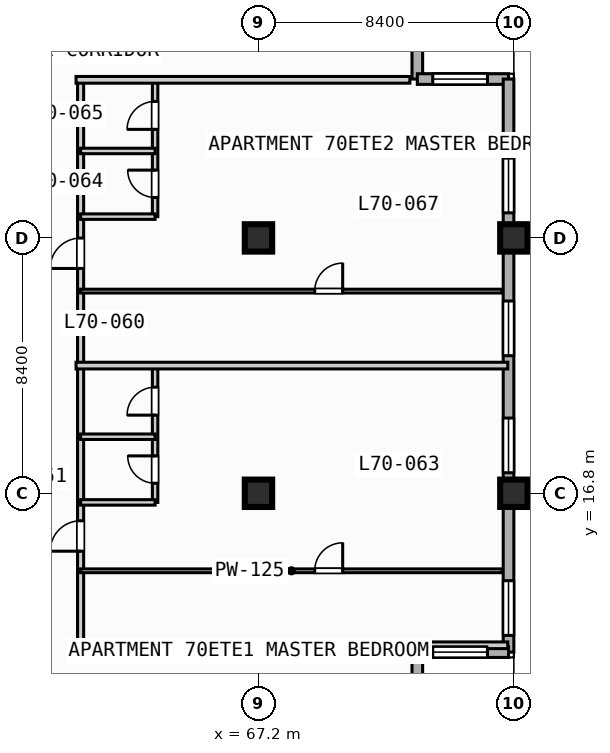
"""IFC4 building model, lengths in metres.
Left out: names, types, materials, properties, quantities, classifications, styles, units other than length and angle.
Written with IfcOpenShell. Run it as: python <this file> out.ifc"""

import sys

from ifc_helpers import new_model, si_unit, direction, frame, frame_2d, origin, origin_2d, place, context, subcontext, project, spatial, rectangle, extrude, element, fill, save


model = new_model("IFC4")
c1 = context("Model", 3, precision=1e-05, world=origin(), true_north=direction((0.0, 1.0)))
c2 = subcontext(c1, "Body", "Model", "MODEL_VIEW")
j1 = project(units=[si_unit("LENGTHUNIT", "METRE"), si_unit("PLANEANGLEUNIT", "RADIAN")], contexts=[c1])
p1 = place(None, origin())
s1 = spatial("IfcSite", under=j1, at=p1, CompositionType="ELEMENT")
p2 = place(p1, origin())
s2 = spatial("IfcBuilding", under=s1, at=p2, CompositionType="ELEMENT")
p3 = place(p2, frame((0.0, 0.0, 282.3)))
s3 = spatial("IfcBuildingStorey", under=s2, at=p3, CompositionType="ELEMENT", Elevation=282.3)
for number, where, z_axis, x_axis in (
    (1, (67.2, 16.8, 0.0), (0.0, 0.0, 1.0), (1.0, 0.0, 0.0)),
    (2, (67.2, 25.2, 0.0), (0.0, 0.0, 1.0), (1.0, 0.0, 0.0)),
    (3, (75.6, 16.8, 0.0), (0.0, 0.0, 1.0), (1.0, 0.0, 0.0)),
    (4, (75.6, 25.2, 0.0), (0.0, 0.0, 1.0), (1.0, 0.0, 0.0)),
):
    element("IfcColumn", number, at=place(p3, frame(where, z_axis=z_axis, x_axis=x_axis)), inside=s3, PredefinedType="COLUMN", context=c2, shape_type="SweptSolid", body=[
        extrude(rectangle(XDim=0.9, YDim=0.9, at=origin_2d()), origin(), (0.0, 0.0, 1.0), 3.7),
    ])
p4 = place(p3, frame((72.425, 33.425, 0.0), z_axis=(0.0, 0.0, 1.0), x_axis=(0.0, -1.0, 0.0)))
e5 = element("IfcWall", 5, at=p4, inside=s3, PredefinedType="STANDARD", context=c2, shape_type="SweptSolid", body=[
    extrude(rectangle(XDim=3.0, YDim=0.35, at=frame_2d((1.5, 0.0))), origin(), (0.0, 0.0, 1.0), 3.47),
])
p5 = place(p3, frame((72.425, 30.425, 0.0), z_axis=(0.0, 0.0, 1.0), x_axis=(1.0, 0.0, 0.0)))
e6 = element("IfcWall", 6, at=p5, inside=s3, PredefinedType="STANDARD", context=c2, shape_type="SweptSolid", body=[
    extrude(rectangle(XDim=3.0, YDim=0.35, at=frame_2d((1.5, 0.0))), origin(), (0.0, 0.0, 1.0), 3.47),
])
p6 = place(p5, frame((0.508, 0.0, 0.85)))
e7 = element("IfcOpeningElement", 7, at=p6, cuts=e6, PredefinedType="OPENING", context=c2, shape_type="SweptSolid", body=[
    extrude(rectangle(XDim=1.8, YDim=1.8, at=frame_2d((0.9, 0.9))), frame((0.0, 0.185, 0.0), z_axis=(0.0, -1.0, 0.0), x_axis=(1.0, 0.0, 0.0)), (0.0, 0.0, 1.0), 0.37),
])
p7 = place(p3, frame((75.425, 30.425, 0.0), z_axis=(0.0, 0.0, 1.0), x_axis=(0.0, -1.0, 0.0)))
e8 = element("IfcWall", 8, at=p7, inside=s3, PredefinedType="STANDARD", context=c2, shape_type="SweptSolid", body=[
    extrude(rectangle(XDim=18.85, YDim=0.35, at=frame_2d((9.425, 0.0))), origin(), (0.0, 0.0, 1.0), 3.47),
])
p8 = place(p7, frame((16.5, 0.0, 0.85)))
e9 = element("IfcOpeningElement", 9, at=p8, cuts=e8, PredefinedType="OPENING", context=c2, shape_type="SweptSolid", body=[
    extrude(rectangle(XDim=1.8, YDim=1.8, at=frame_2d((0.9, 0.9))), frame((0.0, 0.185, 0.0), z_axis=(0.0, -1.0, 0.0), x_axis=(1.0, 0.0, 0.0)), (0.0, 0.0, 1.0), 0.37),
])
p9 = place(p7, frame((11.15, 0.0, 0.85)))
e10 = element("IfcOpeningElement", 10, at=p9, cuts=e8, PredefinedType="OPENING", context=c2, shape_type="SweptSolid", body=[
    extrude(rectangle(XDim=1.8, YDim=1.8, at=frame_2d((0.9, 0.9))), frame((0.0, 0.185, 0.0), z_axis=(0.0, -1.0, 0.0), x_axis=(1.0, 0.0, 0.0)), (0.0, 0.0, 1.0), 0.37),
])
p10 = place(p7, frame((7.3, 0.0, 0.85)))
e11 = element("IfcOpeningElement", 11, at=p10, cuts=e8, PredefinedType="OPENING", context=c2, shape_type="SweptSolid", body=[
    extrude(rectangle(XDim=1.8, YDim=1.8, at=frame_2d((0.9, 0.9))), frame((0.0, 0.185, 0.0), z_axis=(0.0, -1.0, 0.0), x_axis=(1.0, 0.0, 0.0)), (0.0, 0.0, 1.0), 0.37),
])
p11 = place(p7, frame((2.6, 0.0, 0.85)))
e12 = element("IfcOpeningElement", 12, at=p11, cuts=e8, PredefinedType="OPENING", context=c2, shape_type="SweptSolid", body=[
    extrude(rectangle(XDim=1.8, YDim=1.8, at=frame_2d((0.9, 0.9))), frame((0.0, 0.185, 0.0), z_axis=(0.0, -1.0, 0.0), x_axis=(1.0, 0.0, 0.0)), (0.0, 0.0, 1.0), 0.37),
])
p12 = place(p3, frame((75.425, 11.575, 0.0), z_axis=(0.0, 0.0, 1.0), x_axis=(-1.0, 0.0, 0.0)))
e13 = element("IfcWall", 13, at=p12, inside=s3, PredefinedType="STANDARD", context=c2, shape_type="SweptSolid", body=[
    extrude(rectangle(XDim=3.0, YDim=0.35, at=frame_2d((1.5, 0.0))), origin(), (0.0, 0.0, 1.0), 3.47),
])
p13 = place(p12, frame((0.692, 0.0, 0.85)))
e14 = element("IfcOpeningElement", 14, at=p13, cuts=e13, PredefinedType="OPENING", context=c2, shape_type="SweptSolid", body=[
    extrude(rectangle(XDim=1.8, YDim=1.8, at=frame_2d((0.9, 0.9))), frame((0.0, 0.185, 0.0), z_axis=(0.0, -1.0, 0.0), x_axis=(1.0, 0.0, 0.0)), (0.0, 0.0, 1.0), 0.37),
])
p14 = place(p3, frame((72.425, 11.575, 0.0), z_axis=(0.0, 0.0, 1.0), x_axis=(0.0, -1.0, 0.0)))
e15 = element("IfcWall", 15, at=p14, inside=s3, PredefinedType="STANDARD", context=c2, shape_type="SweptSolid", body=[
    extrude(rectangle(XDim=3.0, YDim=0.35, at=frame_2d((1.5, 0.0))), origin(), (0.0, 0.0, 1.0), 3.47),
])
p15 = place(p3, frame((61.35, 11.8, 0.0), z_axis=(0.0, 0.0, 1.0), x_axis=(0.0, 1.0, 0.0)))
e16 = element("IfcWall", 16, at=p15, inside=s3, PredefinedType="PARTITIONING", context=c2, shape_type="SweptSolid", body=[
    extrude(rectangle(XDim=18.6, YDim=0.2, at=frame_2d((9.3, 0.0))), origin(), (0.0, 0.0, 1.0), 3.47),
])
p16 = place(p15, frame((3.095, 0.0, 0.0)))
e17 = element("IfcOpeningElement", 17, at=p16, cuts=e16, PredefinedType="OPENING", context=c2, shape_type="SweptSolid", body=[
    extrude(rectangle(XDim=1.0, YDim=2.15, at=frame_2d((0.5, 1.075))), frame((0.0, 0.11, 0.0), z_axis=(0.0, -1.0, 0.0), x_axis=(1.0, 0.0, 0.0)), (0.0, 0.0, 1.0), 0.22),
])
p17 = place(p15, frame((12.395, 0.0, 0.0)))
e18 = element("IfcOpeningElement", 18, at=p17, cuts=e16, PredefinedType="OPENING", context=c2, shape_type="SweptSolid", body=[
    extrude(rectangle(XDim=1.0, YDim=2.15, at=frame_2d((0.5, 1.075))), frame((0.0, 0.11, 0.0), z_axis=(0.0, -1.0, 0.0), x_axis=(1.0, 0.0, 0.0)), (0.0, 0.0, 1.0), 0.22),
])
p18 = place(p3, frame((61.2, 11.8, 0.0), z_axis=(0.0, 0.0, 1.0), x_axis=(1.0, 0.0, 0.0)))
e19 = element("IfcWall", 19, at=p18, inside=s3, PredefinedType="PARTITIONING", context=c2, shape_type="SweptSolid", body=[
    extrude(rectangle(XDim=14.2, YDim=0.22, at=frame_2d((7.1, 0.0))), origin(), (0.0, 0.0, 1.0), 3.47),
])
p19 = place(p3, frame((63.8, 16.5, 0.0), z_axis=(0.0, 0.0, 1.0), x_axis=(0.0, 1.0, 0.0)))
e20 = element("IfcWall", 20, at=p19, inside=s3, PredefinedType="PLUMBINGWALL", context=c2, shape_type="SweptSolid", body=[
    extrude(rectangle(XDim=4.5, YDim=0.18, at=frame_2d((2.25, 0.0))), origin(), (0.0, 0.0, 1.0), 3.47),
])
p20 = place(p19, frame((0.63, 0.0, 0.0)))
e21 = element("IfcOpeningElement", 21, at=p20, cuts=e20, PredefinedType="OPENING", context=c2, shape_type="SweptSolid", body=[
    extrude(rectangle(XDim=0.9, YDim=2.1, at=frame_2d((0.45, 1.05))), frame((0.0, 0.1, 0.0), z_axis=(0.0, -1.0, 0.0), x_axis=(1.0, 0.0, 0.0)), (0.0, 0.0, 1.0), 0.2),
])
p21 = place(p19, frame((2.87, 0.0, 0.0)))
e22 = element("IfcOpeningElement", 22, at=p21, cuts=e20, PredefinedType="OPENING", context=c2, shape_type="SweptSolid", body=[
    extrude(rectangle(XDim=0.92, YDim=2.1, at=frame_2d((0.46, 1.05))), frame((0.0, 0.1, 0.0), z_axis=(0.0, -1.0, 0.0), x_axis=(1.0, 0.0, 0.0)), (0.0, 0.0, 1.0), 0.2),
])
for number, where, z_axis, x_axis in (
    (23, (61.35, 16.5, 0.0), (0.0, 0.0, 1.0), (1.0, 0.0, 0.0)),
    (24, (61.35, 18.66, 0.0), (0.0, 0.0, 1.0), (1.0, 0.0, 0.0)),
):
    element("IfcWall", number, at=place(p3, frame(where, z_axis=z_axis, x_axis=x_axis)), inside=s3, PredefinedType="PLUMBINGWALL", context=c2, shape_type="SweptSolid", body=[
        extrude(rectangle(XDim=2.45, YDim=0.18, at=frame_2d((1.225, 0.0))), origin(), (0.0, 0.0, 1.0), 3.47),
    ])
p22 = place(p3, frame((61.35, 14.25, 0.0), z_axis=(0.0, 0.0, 1.0), x_axis=(1.0, 0.0, 0.0)))
e25 = element("IfcWall", 25, at=p22, inside=s3, PredefinedType="PARTITIONING", context=c2, shape_type="SweptSolid", body=[
    extrude(rectangle(XDim=13.87, YDim=0.125, at=frame_2d((6.935, 0.0))), origin(), (0.0, 0.0, 1.0), 3.47),
])
p23 = place(p22, frame((7.7, 0.0, 0.0)))
e26 = element("IfcOpeningElement", 26, at=p23, cuts=e25, PredefinedType="OPENING", context=c2, shape_type="SweptSolid", body=[
    extrude(rectangle(XDim=0.92, YDim=2.1, at=frame_2d((0.46, 1.05))), frame((0.0, 0.073, 0.0), z_axis=(0.0, -1.0, 0.0), x_axis=(1.0, 0.0, 0.0)), (0.0, 0.0, 1.0), 0.145),
])
p24 = place(p3, frame((61.2, 21.0, 0.0), z_axis=(0.0, 0.0, 1.0), x_axis=(1.0, 0.0, 0.0)))
e27 = element("IfcWall", 27, at=p24, inside=s3, PredefinedType="PARTITIONING", context=c2, shape_type="SweptSolid", body=[
    extrude(rectangle(XDim=14.2, YDim=0.22, at=frame_2d((7.1, 0.0))), origin(), (0.0, 0.0, 1.0), 3.47),
])
p25 = place(p3, frame((63.8, 25.9, 0.0), z_axis=(0.0, 0.0, 1.0), x_axis=(0.0, 1.0, 0.0)))
e28 = element("IfcWall", 28, at=p25, inside=s3, PredefinedType="PLUMBINGWALL", context=c2, shape_type="SweptSolid", body=[
    extrude(rectangle(XDim=4.5, YDim=0.18, at=frame_2d((2.25, 0.0))), origin(), (0.0, 0.0, 1.0), 3.47),
])
p26 = place(p25, frame((0.63, 0.0, 0.0)))
e29 = element("IfcOpeningElement", 29, at=p26, cuts=e28, PredefinedType="OPENING", context=c2, shape_type="SweptSolid", body=[
    extrude(rectangle(XDim=0.9, YDim=2.1, at=frame_2d((0.45, 1.05))), frame((0.0, 0.1, 0.0), z_axis=(0.0, -1.0, 0.0), x_axis=(1.0, 0.0, 0.0)), (0.0, 0.0, 1.0), 0.2),
])
p27 = place(p25, frame((2.87, 0.0, 0.0)))
e30 = element("IfcOpeningElement", 30, at=p27, cuts=e28, PredefinedType="OPENING", context=c2, shape_type="SweptSolid", body=[
    extrude(rectangle(XDim=0.92, YDim=2.1, at=frame_2d((0.46, 1.05))), frame((0.0, 0.1, 0.0), z_axis=(0.0, -1.0, 0.0), x_axis=(1.0, 0.0, 0.0)), (0.0, 0.0, 1.0), 0.2),
])
for number, where, z_axis, x_axis in (
    (31, (61.35, 25.9, 0.0), (0.0, 0.0, 1.0), (1.0, 0.0, 0.0)),
    (32, (61.35, 28.06, 0.0), (0.0, 0.0, 1.0), (1.0, 0.0, 0.0)),
):
    element("IfcWall", number, at=place(p3, frame(where, z_axis=z_axis, x_axis=x_axis)), inside=s3, PredefinedType="PLUMBINGWALL", context=c2, shape_type="SweptSolid", body=[
        extrude(rectangle(XDim=2.45, YDim=0.18, at=frame_2d((1.225, 0.0))), origin(), (0.0, 0.0, 1.0), 3.47),
    ])
p28 = place(p3, frame((61.35, 23.45, 0.0), z_axis=(0.0, 0.0, 1.0), x_axis=(1.0, 0.0, 0.0)))
e33 = element("IfcWall", 33, at=p28, inside=s3, PredefinedType="PARTITIONING", context=c2, shape_type="SweptSolid", body=[
    extrude(rectangle(XDim=13.87, YDim=0.125, at=frame_2d((6.935, 0.0))), origin(), (0.0, 0.0, 1.0), 3.47),
])
p29 = place(p28, frame((7.7, 0.0, 0.0)))
e34 = element("IfcOpeningElement", 34, at=p29, cuts=e33, PredefinedType="OPENING", context=c2, shape_type="SweptSolid", body=[
    extrude(rectangle(XDim=0.92, YDim=2.1, at=frame_2d((0.46, 1.05))), frame((0.0, 0.073, 0.0), z_axis=(0.0, -1.0, 0.0), x_axis=(1.0, 0.0, 0.0)), (0.0, 0.0, 1.0), 0.145),
])
p30 = place(p3, frame((61.2, 30.4, 0.0), z_axis=(0.0, 0.0, 1.0), x_axis=(1.0, 0.0, 0.0)))
e35 = element("IfcWall", 35, at=p30, inside=s3, PredefinedType="PARTITIONING", context=c2, shape_type="SweptSolid", body=[
    extrude(rectangle(XDim=10.98, YDim=0.22, at=frame_2d((5.49, 0.0))), origin(), (0.0, 0.0, 1.0), 3.47),
])
p31 = place(p6, origin())
e36 = element("IfcWindow", 36, at=p31, inside=s3, PartitioningType="SINGLE_PANEL", PredefinedType="WINDOW", context=c2, shape_type="SweptSolid", body=[
    extrude(rectangle(XDim=1.8, YDim=1.8, at=frame_2d((0.9, 0.9))), frame((0.0, 0.03, 0.0), z_axis=(0.0, -1.0, 0.0), x_axis=(1.0, 0.0, 0.0)), (0.0, 0.0, 1.0), 0.06),
])
fill(e7, e36)
p32 = place(p8, origin())
e37 = element("IfcWindow", 37, at=p32, inside=s3, PartitioningType="SINGLE_PANEL", PredefinedType="WINDOW", context=c2, shape_type="SweptSolid", body=[
    extrude(rectangle(XDim=1.8, YDim=1.8, at=frame_2d((0.9, 0.9))), frame((0.0, 0.03, 0.0), z_axis=(0.0, -1.0, 0.0), x_axis=(1.0, 0.0, 0.0)), (0.0, 0.0, 1.0), 0.06),
])
fill(e9, e37)
p33 = place(p9, origin())
e38 = element("IfcWindow", 38, at=p33, inside=s3, PartitioningType="SINGLE_PANEL", PredefinedType="WINDOW", context=c2, shape_type="SweptSolid", body=[
    extrude(rectangle(XDim=1.8, YDim=1.8, at=frame_2d((0.9, 0.9))), frame((0.0, 0.03, 0.0), z_axis=(0.0, -1.0, 0.0), x_axis=(1.0, 0.0, 0.0)), (0.0, 0.0, 1.0), 0.06),
])
fill(e10, e38)
p34 = place(p10, origin())
e39 = element("IfcWindow", 39, at=p34, inside=s3, PartitioningType="SINGLE_PANEL", PredefinedType="WINDOW", context=c2, shape_type="SweptSolid", body=[
    extrude(rectangle(XDim=1.8, YDim=1.8, at=frame_2d((0.9, 0.9))), frame((0.0, 0.03, 0.0), z_axis=(0.0, -1.0, 0.0), x_axis=(1.0, 0.0, 0.0)), (0.0, 0.0, 1.0), 0.06),
])
fill(e11, e39)
p35 = place(p11, origin())
e40 = element("IfcWindow", 40, at=p35, inside=s3, PartitioningType="SINGLE_PANEL", PredefinedType="WINDOW", context=c2, shape_type="SweptSolid", body=[
    extrude(rectangle(XDim=1.8, YDim=1.8, at=frame_2d((0.9, 0.9))), frame((0.0, 0.03, 0.0), z_axis=(0.0, -1.0, 0.0), x_axis=(1.0, 0.0, 0.0)), (0.0, 0.0, 1.0), 0.06),
])
fill(e12, e40)
p36 = place(p13, origin())
e41 = element("IfcWindow", 41, at=p36, inside=s3, PartitioningType="SINGLE_PANEL", PredefinedType="WINDOW", context=c2, shape_type="SweptSolid", body=[
    extrude(rectangle(XDim=1.8, YDim=1.8, at=frame_2d((0.9, 0.9))), frame((0.0, 0.03, 0.0), z_axis=(0.0, -1.0, 0.0), x_axis=(1.0, 0.0, 0.0)), (0.0, 0.0, 1.0), 0.06),
])
fill(e14, e41)
p37 = place(p16, origin())
e42 = element("IfcDoor", 42, at=p37, inside=s3, OperationType="SINGLE_SWING_LEFT", PredefinedType="DOOR", context=c2, shape_type="SweptSolid", body=[
    extrude(rectangle(XDim=1.0, YDim=2.15, at=frame_2d((0.5, 1.075))), frame((0.0, 0.025, 0.0), z_axis=(0.0, -1.0, 0.0), x_axis=(1.0, 0.0, 0.0)), (0.0, 0.0, 1.0), 0.05),
])
fill(e17, e42)
p38 = place(p17, origin())
e43 = element("IfcDoor", 43, at=p38, inside=s3, OperationType="SINGLE_SWING_LEFT", PredefinedType="DOOR", context=c2, shape_type="SweptSolid", body=[
    extrude(rectangle(XDim=1.0, YDim=2.15, at=frame_2d((0.5, 1.075))), frame((0.0, 0.025, 0.0), z_axis=(0.0, -1.0, 0.0), x_axis=(1.0, 0.0, 0.0)), (0.0, 0.0, 1.0), 0.05),
])
fill(e18, e43)
p39 = place(p20, origin())
e44 = element("IfcDoor", 44, at=p39, inside=s3, OperationType="SINGLE_SWING_RIGHT", PredefinedType="DOOR", context=c2, shape_type="SweptSolid", body=[
    extrude(rectangle(XDim=0.9, YDim=2.1, at=frame_2d((0.45, 1.05))), frame((0.0, 0.025, 0.0), z_axis=(0.0, -1.0, 0.0), x_axis=(1.0, 0.0, 0.0)), (0.0, 0.0, 1.0), 0.05),
])
fill(e21, e44)
p40 = place(p21, origin())
e45 = element("IfcDoor", 45, at=p40, inside=s3, OperationType="SINGLE_SWING_LEFT", PredefinedType="DOOR", context=c2, shape_type="SweptSolid", body=[
    extrude(rectangle(XDim=0.92, YDim=2.1, at=frame_2d((0.46, 1.05))), frame((0.0, 0.025, 0.0), z_axis=(0.0, -1.0, 0.0), x_axis=(1.0, 0.0, 0.0)), (0.0, 0.0, 1.0), 0.05),
])
fill(e22, e45)
p41 = place(p23, origin())
e46 = element("IfcDoor", 46, at=p41, inside=s3, OperationType="SINGLE_SWING_RIGHT", PredefinedType="DOOR", context=c2, shape_type="SweptSolid", body=[
    extrude(rectangle(XDim=0.92, YDim=2.1, at=frame_2d((0.46, 1.05))), frame((0.0, 0.025, 0.0), z_axis=(0.0, -1.0, 0.0), x_axis=(1.0, 0.0, 0.0)), (0.0, 0.0, 1.0), 0.05),
])
fill(e26, e46)
p42 = place(p26, origin())
e47 = element("IfcDoor", 47, at=p42, inside=s3, OperationType="SINGLE_SWING_RIGHT", PredefinedType="DOOR", context=c2, shape_type="SweptSolid", body=[
    extrude(rectangle(XDim=0.9, YDim=2.1, at=frame_2d((0.45, 1.05))), frame((0.0, 0.025, 0.0), z_axis=(0.0, -1.0, 0.0), x_axis=(1.0, 0.0, 0.0)), (0.0, 0.0, 1.0), 0.05),
])
fill(e29, e47)
p43 = place(p27, origin())
e48 = element("IfcDoor", 48, at=p43, inside=s3, OperationType="SINGLE_SWING_LEFT", PredefinedType="DOOR", context=c2, shape_type="SweptSolid", body=[
    extrude(rectangle(XDim=0.92, YDim=2.1, at=frame_2d((0.46, 1.05))), frame((0.0, 0.025, 0.0), z_axis=(0.0, -1.0, 0.0), x_axis=(1.0, 0.0, 0.0)), (0.0, 0.0, 1.0), 0.05),
])
fill(e30, e48)
p44 = place(p29, origin())
e49 = element("IfcDoor", 49, at=p44, inside=s3, OperationType="SINGLE_SWING_RIGHT", PredefinedType="DOOR", context=c2, shape_type="SweptSolid", body=[
    extrude(rectangle(XDim=0.92, YDim=2.1, at=frame_2d((0.46, 1.05))), frame((0.0, 0.025, 0.0), z_axis=(0.0, -1.0, 0.0), x_axis=(1.0, 0.0, 0.0)), (0.0, 0.0, 1.0), 0.05),
])
fill(e34, e49)
save(model, sys.argv[1])
